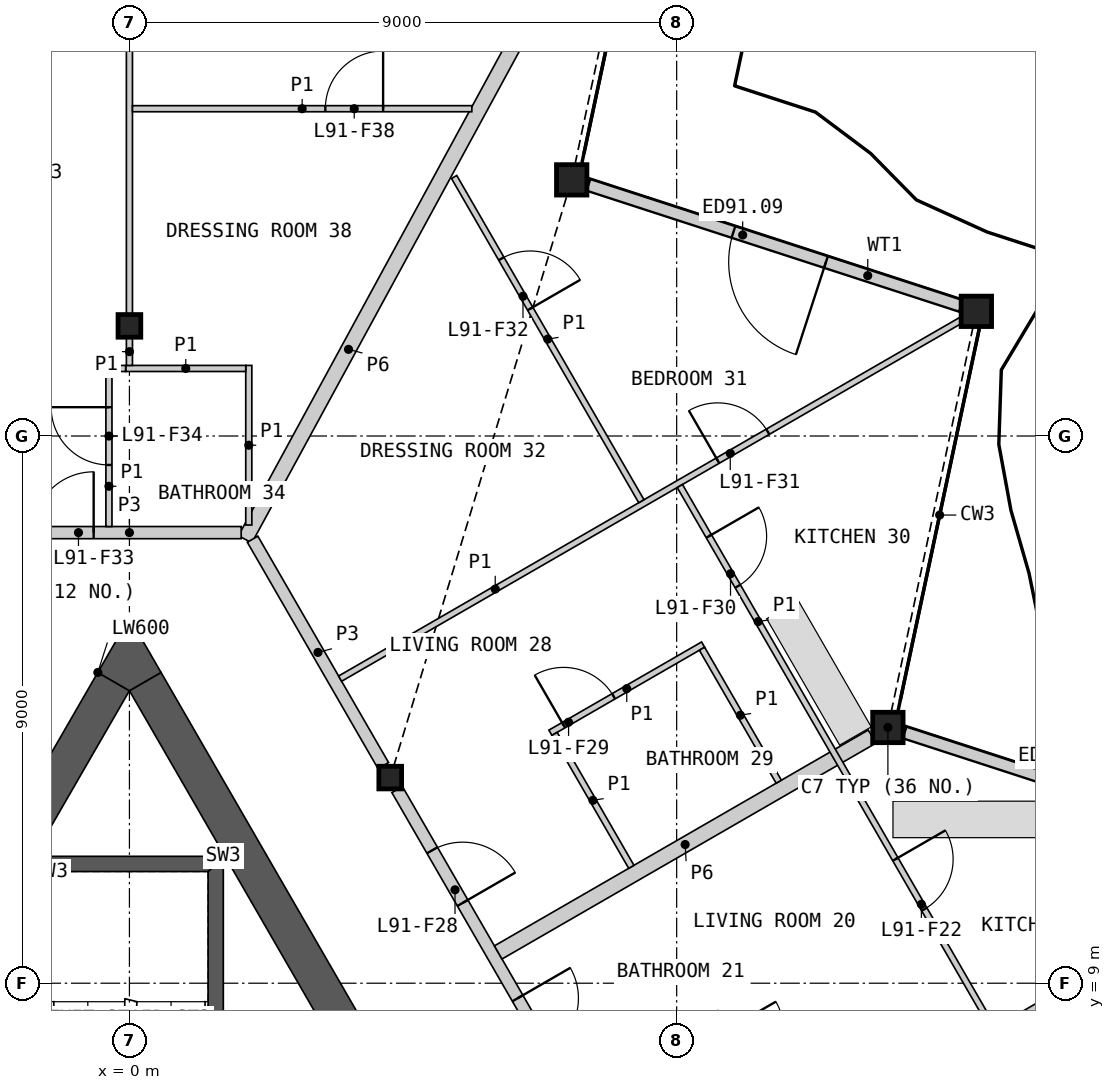
"""IFC4 building model, lengths in metres.
Left out: names, types, materials, properties, quantities, classifications, styles, units other than length and angle.
Written with IfcOpenShell. Run it as: python <this file> out.ifc"""

import sys

from ifc_helpers import new_model, si_unit, direction, frame, frame_2d, origin, origin_2d, place, context, subcontext, project, spatial, polyline, rectangle, hollow_rectangle, i_section, outline, extrude, element, fill, save


model = new_model("IFC4")
c1 = context("Model", 3, precision=1e-05, world=origin(), true_north=direction((0.0, 1.0)))
c2 = subcontext(c1, "Body", "Model", "MODEL_VIEW")
j1 = project(units=[si_unit("LENGTHUNIT", "METRE"), si_unit("PLANEANGLEUNIT", "RADIAN")], contexts=[c1])
p1 = place(None, origin())
s1 = spatial("IfcSite", under=j1, at=p1, CompositionType="ELEMENT")
p2 = place(p1, origin())
s2 = spatial("IfcBuilding", under=s1, at=p2, CompositionType="ELEMENT")
p3 = place(p2, frame((0.0, 0.0, 398.4)))
s3 = spatial("IfcBuildingStorey", under=s2, at=p3, CompositionType="ELEMENT", Elevation=398.4)
for number, where, z_axis, x_axis in (
    (1, (12.474, 13.206, 0.0), (0.0, 0.0, 1.0), (1.0, 0.0, 0.0)),
    (2, (13.929, 20.051, 0.0), (0.0, 0.0, 1.0), (1.0, 0.0, 0.0)),
    (3, (7.274, 22.213, 0.0), (0.0, 0.0, 1.0), (1.0, 0.0, 0.0)),
):
    element("IfcColumn", number, at=place(p3, frame(where, z_axis=z_axis, x_axis=x_axis)), inside=s3, PredefinedType="COLUMN", context=c2, shape_type="SweptSolid", body=[
        extrude(hollow_rectangle(XDim=0.5, YDim=0.5, WallThickness=0.03, at=origin_2d()), origin(), (0.0, 0.0, 1.0), 3.4),
    ])
for number, where, z_axis, x_axis in (
    (4, (0.0, 19.811, 0.0), (0.0, 0.0, 1.0), (1.0, 0.0, 0.0)),
    (5, (4.289, 12.382, 0.0), (0.0, 0.0, 1.0), (1.0, 0.0, 0.0)),
):
    element("IfcColumn", number, at=place(p3, frame(where, z_axis=z_axis, x_axis=x_axis)), inside=s3, PredefinedType="COLUMN", context=c2, shape_type="SweptSolid", body=[
        extrude(i_section(OverallWidth=0.374, OverallDepth=0.372, WebThickness=0.016, FlangeThickness=0.026, at=origin_2d()), origin(), (0.0, 0.0, 1.0), 3.4),
    ])
p4 = place(p3, frame((18.874, 11.134, 0.0), z_axis=(0.0, 0.0, 1.0), x_axis=(-0.951063037463, 0.308996923563, 0.0)))
e6 = element("IfcWall", 6, at=p4, inside=s3, PredefinedType="SOLIDWALL", context=c2, shape_type="SweptSolid", body=[
    extrude(rectangle(XDim=6.44, YDim=0.2, at=frame_2d((3.22, 0.0))), origin(), (0.0, 0.0, 1.0), 2.634),
])
p5 = place(p4, frame((2.333, 0.0, 0.0)))
e7 = element("IfcOpeningElement", 7, at=p5, cuts=e6, PredefinedType="OPENING", context=c2, shape_type="SweptSolid", body=[
    extrude(rectangle(XDim=1.6, YDim=2.25, at=frame_2d((0.8, 1.125))), frame((0.0, 0.11, 0.0), z_axis=(0.0, -1.0, 0.0), x_axis=(1.0, 0.0, 0.0)), (0.0, 0.0, 1.0), 0.22),
])
p6 = place(p3, frame((13.674, 20.14, 0.0), z_axis=(0.0, 0.0, 1.0), x_axis=(-0.951051896423, 0.309031212518, 0.0)))
e8 = element("IfcWall", 8, at=p6, inside=s3, PredefinedType="SOLIDWALL", context=c2, shape_type="SweptSolid", body=[
    extrude(rectangle(XDim=6.44, YDim=0.2, at=frame_2d((3.22, 0.0))), origin(), (0.0, 0.0, 1.0), 2.634),
])
p7 = place(p6, frame((2.333, 0.0, 0.0)))
e9 = element("IfcOpeningElement", 9, at=p7, cuts=e8, PredefinedType="OPENING", context=c2, shape_type="SweptSolid", body=[
    extrude(rectangle(XDim=1.6, YDim=2.25, at=frame_2d((0.8, 1.125))), frame((0.0, 0.11, 0.0), z_axis=(0.0, -1.0, 0.0), x_axis=(1.0, 0.0, 0.0)), (0.0, 0.0, 1.0), 0.22),
])
p8 = place(p3, origin())
e10 = element("IfcWall", 10, at=p8, inside=s3, PredefinedType="SHEAR", context=c2, shape_type="SweptSolid", body=[
    extrude(outline(polyline([(1.544, 5.237), (1.544, 11.087), (1.294, 10.837), (1.294, 5.237), (1.544, 5.237)])), origin(), (0.0, 0.0, 1.0), 3.1),
])
p9 = place(p3, origin())
e11 = element("IfcWall", 11, at=p9, inside=s3, PredefinedType="SHEAR", context=c2, shape_type="SweptSolid", body=[
    extrude(outline(polyline([(1.544, 11.087), (-1.544, 11.087), (-1.294, 10.837), (1.294, 10.837), (1.544, 11.087)])), origin(), (0.0, 0.0, 1.0), 3.1),
])
p10 = place(p3, frame((8.686, -0.634, 0.0), z_axis=(0.0, 0.0, 1.0), x_axis=(-0.500004601921, 0.866022746848, 0.0)))
e12 = element("IfcWall", 12, at=p10, inside=s3, PredefinedType="SHEAR", context=c2, shape_type="SweptSolid", body=[
    extrude(rectangle(XDim=16.853, YDim=0.6, at=frame_2d((8.426, 0.0))), origin(), (0.0, 0.0, 1.0), 3.1),
])
p11 = place(p3, frame((-0.26, 13.961, 0.0), z_axis=(0.0, 0.0, 1.0), x_axis=(-0.50000604952, -0.866021911064, 0.0)))
e13 = element("IfcWall", 13, at=p11, inside=s3, PredefinedType="SHEAR", context=c2, shape_type="SweptSolid", body=[
    extrude(rectangle(XDim=4.869, YDim=0.6, at=frame_2d((2.434, 0.0))), origin(), (0.0, 0.0, 1.0), 3.1),
])
p12 = place(p3, origin())
e14 = element("IfcWall", 14, at=p12, inside=s3, PredefinedType="SHEAR", context=c2, shape_type="SweptSolid", body=[
    extrude(outline(polyline([(-0.52, 14.111), (0.0, 15.011), (0.52, 14.111), (0.0, 13.811), (-0.52, 14.111)])), origin(), (0.0, 0.0, 1.0), 3.1),
])
p13 = place(p3, frame((1.903, 16.301, 0.0), z_axis=(0.0, 0.0, 1.0), x_axis=(0.47791275145, 0.878407309852, 0.0)))
e15 = element("IfcWall", 15, at=p13, inside=s3, PredefinedType="PARTITIONING", context=c2, shape_type="SweptSolid", body=[
    extrude(rectangle(XDim=14.226, YDim=0.25, at=frame_2d((7.113, 0.0))), origin(), (0.0, 0.0, 1.0), 2.33),
])
p14 = place(p3, frame((4.403, 12.185, 0.0), z_axis=(0.0, 0.0, 1.0), x_axis=(0.499992155518, -0.866029932751, 0.0)))
e16 = element("IfcWall", 16, at=p14, inside=s3, PredefinedType="PARTITIONING", context=c2, shape_type="SweptSolid", body=[
    extrude(rectangle(XDim=8.123, YDim=0.2, at=frame_2d((4.062, 0.0))), origin(), (0.0, 0.0, 1.0), 3.1),
])
p15 = place(p14, frame((3.963, 0.0, 0.0)))
e17 = element("IfcOpeningElement", 17, at=p15, cuts=e16, PredefinedType="OPENING", context=c2, shape_type="SweptSolid", body=[
    extrude(rectangle(XDim=1.0, YDim=2.1, at=frame_2d((0.5, 1.05))), frame((0.0, 0.11, 0.0), z_axis=(0.0, -1.0, 0.0), x_axis=(1.0, 0.0, 0.0)), (0.0, 0.0, 1.0), 0.22),
])
p16 = place(p14, frame((1.153, 0.0, 0.0)))
e18 = element("IfcOpeningElement", 18, at=p16, cuts=e16, PredefinedType="OPENING", context=c2, shape_type="SweptSolid", body=[
    extrude(rectangle(XDim=1.0, YDim=2.1, at=frame_2d((0.5, 1.05))), frame((0.0, 0.11, 0.0), z_axis=(0.0, -1.0, 0.0), x_axis=(1.0, 0.0, 0.0)), (0.0, 0.0, 1.0), 0.22),
])
p17 = place(p3, frame((6.065, 9.506, 0.0), z_axis=(0.0, 0.0, 1.0), x_axis=(0.866018949465, 0.500011179042, 0.0)))
e19 = element("IfcWall", 19, at=p17, inside=s3, PredefinedType="PARTITIONING", context=c2, shape_type="SweptSolid", body=[
    extrude(rectangle(XDim=7.1, YDim=0.25, at=frame_2d((3.55, 0.0))), origin(), (0.0, 0.0, 1.0), 2.33),
])
p18 = place(p3, frame((2.025, 16.303, 0.0), z_axis=(0.0, 0.0, 1.0), x_axis=(0.500004215162, -0.866022970146, 0.0)))
e20 = element("IfcWall", 20, at=p18, inside=s3, PredefinedType="PARTITIONING", context=c2, shape_type="SweptSolid", body=[
    extrude(rectangle(XDim=4.3, YDim=0.2, at=frame_2d((2.15, 0.0))), origin(), (0.0, 0.0, 1.0), 3.1),
])
p19 = place(p3, frame((-1.838, 16.411, 0.0), z_axis=(0.0, 0.0, 1.0), x_axis=(1.0, 0.0, 0.0)))
e21 = element("IfcWall", 21, at=p19, inside=s3, PredefinedType="PARTITIONING", context=c2, shape_type="SweptSolid", body=[
    extrude(rectangle(XDim=3.676, YDim=0.2, at=frame_2d((1.838, 0.0))), origin(), (0.0, 0.0, 1.0), 3.1),
])
p20 = place(p19, frame((0.25, 0.0, 0.0)))
e22 = element("IfcOpeningElement", 22, at=p20, cuts=e21, PredefinedType="OPENING", context=c2, shape_type="SweptSolid", body=[
    extrude(rectangle(XDim=1.0, YDim=2.1, at=frame_2d((0.5, 1.05))), frame((0.0, 0.11, 0.0), z_axis=(0.0, -1.0, 0.0), x_axis=(1.0, 0.0, 0.0)), (0.0, 0.0, 1.0), 0.22),
])
p21 = place(p3, frame((3.465, 14.01, 0.0), z_axis=(0.0, 0.0, 1.0), x_axis=(0.866032376801, 0.499987922186, 0.0)))
e23 = element("IfcWall", 23, at=p21, inside=s3, PredefinedType="PARTITIONING", context=c2, shape_type="SweptSolid", body=[
    extrude(rectangle(XDim=11.782, YDim=0.1, at=frame_2d((5.891, 0.0))), origin(), (0.0, 0.0, 1.0), 2.33),
])
p22 = place(p21, frame((7.171, 0.0, 0.0)))
e24 = element("IfcOpeningElement", 24, at=p22, cuts=e23, PredefinedType="OPENING", context=c2, shape_type="SweptSolid", body=[
    extrude(rectangle(XDim=0.95, YDim=2.1, at=frame_2d((0.475, 1.05))), frame((0.0, 0.06, 0.0), z_axis=(0.0, -1.0, 0.0), x_axis=(1.0, 0.0, 0.0)), (0.0, 0.0, 1.0), 0.12),
])
p23 = place(p3, frame((8.775, 5.066, 0.0), z_axis=(0.0, 0.0, 1.0), x_axis=(0.866023724155, 0.500002909193, 0.0)))
e25 = element("IfcWall", 25, at=p23, inside=s3, PredefinedType="PARTITIONING", context=c2, shape_type="SweptSolid", body=[
    extrude(rectangle(XDim=11.655, YDim=0.1, at=frame_2d((5.827, 0.0))), origin(), (0.0, 0.0, 1.0), 2.33),
])
p24 = place(p23, frame((4.252, 0.0, 0.0)))
e26 = element("IfcOpeningElement", 26, at=p24, cuts=e25, PredefinedType="OPENING", context=c2, shape_type="SweptSolid", body=[
    extrude(rectangle(XDim=0.95, YDim=2.1, at=frame_2d((0.475, 1.05))), frame((0.0, 0.06, 0.0), z_axis=(0.0, -1.0, 0.0), x_axis=(1.0, 0.0, 0.0)), (0.0, 0.0, 1.0), 0.12),
])
p25 = place(p3, frame((0.0, 20.008, 0.0), z_axis=(0.0, 0.0, 1.0), x_axis=(0.0, 1.0, 0.0)))
e27 = element("IfcWall", 27, at=p25, inside=s3, PredefinedType="PARTITIONING", context=c2, shape_type="SweptSolid", body=[
    extrude(rectangle(XDim=10.951, YDim=0.1, at=frame_2d((5.476, 0.0))), origin(), (0.0, 0.0, 1.0), 2.33),
])
p26 = place(p25, frame((8.851, 0.0, 0.0)))
e28 = element("IfcOpeningElement", 28, at=p26, cuts=e27, PredefinedType="OPENING", context=c2, shape_type="SweptSolid", body=[
    extrude(rectangle(XDim=0.95, YDim=2.1, at=frame_2d((0.475, 1.05))), frame((0.0, 0.06, 0.0), z_axis=(0.0, -1.0, 0.0), x_axis=(1.0, 0.0, 0.0)), (0.0, 0.0, 1.0), 0.12),
])
p27 = place(p3, frame((9.052, 17.177, 0.0), z_axis=(0.0, 0.0, 1.0), x_axis=(0.499998765615, -0.866026116456, 0.0)))
e29 = element("IfcWall", 29, at=p27, inside=s3, PredefinedType="PARTITIONING", context=c2, shape_type="SweptSolid", body=[
    extrude(rectangle(XDim=10.3, YDim=0.1, at=frame_2d((5.15, 0.0))), origin(), (0.0, 0.0, 1.0), 2.33),
])
p28 = place(p27, frame((7.089, 0.0, 0.0)))
e30 = element("IfcOpeningElement", 30, at=p28, cuts=e29, PredefinedType="OPENING", context=c2, shape_type="SweptSolid", body=[
    extrude(rectangle(XDim=0.95, YDim=2.1, at=frame_2d((0.475, 1.05))), frame((0.0, 0.06, 0.0), z_axis=(0.0, -1.0, 0.0), x_axis=(1.0, 0.0, 0.0)), (0.0, 0.0, 1.0), 0.12),
])
p29 = place(p27, frame((0.954, 0.0, 0.0)))
e31 = element("IfcOpeningElement", 31, at=p29, cuts=e29, PredefinedType="OPENING", context=c2, shape_type="SweptSolid", body=[
    extrude(rectangle(XDim=0.95, YDim=2.1, at=frame_2d((0.475, 1.05))), frame((0.0, 0.06, 0.0), z_axis=(0.0, -1.0, 0.0), x_axis=(1.0, 0.0, 0.0)), (0.0, 0.0, 1.0), 0.12),
])
p30 = place(p3, frame((5.34, 22.26, 0.0), z_axis=(0.0, 0.0, 1.0), x_axis=(0.500027893485, -0.866009298874, 0.0)))
e32 = element("IfcWall", 32, at=p30, inside=s3, PredefinedType="PARTITIONING", context=c2, shape_type="SweptSolid", body=[
    extrude(rectangle(XDim=6.158, YDim=0.1, at=frame_2d((3.079, 0.0))), origin(), (0.0, 0.0, 1.0), 2.33),
])
p31 = place(p30, frame((1.552, 0.0, 0.0)))
e33 = element("IfcOpeningElement", 33, at=p31, cuts=e32, PredefinedType="OPENING", context=c2, shape_type="SweptSolid", body=[
    extrude(rectangle(XDim=0.95, YDim=2.1, at=frame_2d((0.475, 1.05))), frame((0.0, 0.06, 0.0), z_axis=(0.0, -1.0, 0.0), x_axis=(1.0, 0.0, 0.0)), (0.0, 0.0, 1.0), 0.12),
])
p32 = place(p3, frame((0.05, 23.383, 0.0), z_axis=(0.0, 0.0, 1.0), x_axis=(1.0, 0.0, 0.0)))
e34 = element("IfcWall", 34, at=p32, inside=s3, PredefinedType="PARTITIONING", context=c2, shape_type="SweptSolid", body=[
    extrude(rectangle(XDim=5.581, YDim=0.1, at=frame_2d((2.791, 0.0))), origin(), (0.0, 0.0, 1.0), 2.33),
])
p33 = place(p32, frame((3.172, 0.0, 0.0)))
e35 = element("IfcOpeningElement", 35, at=p33, cuts=e34, PredefinedType="OPENING", context=c2, shape_type="SweptSolid", body=[
    extrude(rectangle(XDim=0.95, YDim=2.1, at=frame_2d((0.475, 1.05))), frame((0.0, 0.06, 0.0), z_axis=(0.0, -1.0, 0.0), x_axis=(1.0, 0.0, 0.0)), (0.0, 0.0, 1.0), 0.12),
])
p34 = place(p3, frame((6.923, 13.119, 0.0), z_axis=(0.0, 0.0, 1.0), x_axis=(0.866032775405, 0.499987231761, 0.0)))
e36 = element("IfcWall", 36, at=p34, inside=s3, PredefinedType="PARTITIONING", context=c2, shape_type="SweptSolid", body=[
    extrude(rectangle(XDim=2.9, YDim=0.1, at=frame_2d((1.45, 0.0))), origin(), (0.0, 0.0, 1.0), 2.33),
])
p35 = place(p34, frame((0.25, 0.0, 0.0)))
e37 = element("IfcOpeningElement", 37, at=p35, cuts=e36, PredefinedType="OPENING", context=c2, shape_type="SweptSolid", body=[
    extrude(rectangle(XDim=0.95, YDim=2.1, at=frame_2d((0.475, 1.05))), frame((0.0, 0.06, 0.0), z_axis=(0.0, -1.0, 0.0), x_axis=(1.0, 0.0, 0.0)), (0.0, 0.0, 1.0), 0.12),
])
p36 = place(p3, frame((1.963, 16.536, 0.0), z_axis=(0.0, 0.0, 1.0), x_axis=(0.0, 1.0, 0.0)))
e38 = element("IfcWall", 38, at=p36, inside=s3, PredefinedType="PARTITIONING", context=c2, shape_type="SweptSolid", body=[
    extrude(rectangle(XDim=2.625, YDim=0.1, at=frame_2d((1.312, 0.0))), origin(), (0.0, 0.0, 1.0), 2.33),
])
p37 = place(p3, frame((9.417, 14.501, 0.0), z_axis=(0.0, 0.0, 1.0), x_axis=(0.500048846702, -0.865997200291, 0.0)))
e39 = element("IfcWall", 39, at=p37, inside=s3, PredefinedType="PARTITIONING", context=c2, shape_type="SweptSolid", body=[
    extrude(rectangle(XDim=2.525, YDim=0.1, at=frame_2d((1.263, 0.0))), origin(), (0.0, 0.0, 1.0), 2.33),
])
p38 = place(p3, frame((6.992, 13.101, 0.0), z_axis=(0.0, 0.0, 1.0), x_axis=(0.499976333282, -0.866039067339, 0.0)))
e40 = element("IfcWall", 40, at=p38, inside=s3, PredefinedType="PARTITIONING", context=c2, shape_type="SweptSolid", body=[
    extrude(rectangle(XDim=2.525, YDim=0.1, at=frame_2d((1.262, 0.0))), origin(), (0.0, 0.0, 1.0), 2.33),
])
p39 = place(p3, frame((-0.337, 16.511, 0.0), z_axis=(0.0, 0.0, 1.0), x_axis=(0.0, 1.0, 0.0)))
e41 = element("IfcWall", 41, at=p39, inside=s3, PredefinedType="PARTITIONING", context=c2, shape_type="SweptSolid", body=[
    extrude(rectangle(XDim=2.649, YDim=0.1, at=frame_2d((1.325, 0.0))), origin(), (0.0, 0.0, 1.0), 2.33),
])
p40 = place(p39, frame((1.013, 0.0, 0.0)))
e42 = element("IfcOpeningElement", 42, at=p40, cuts=e41, PredefinedType="OPENING", context=c2, shape_type="SweptSolid", body=[
    extrude(rectangle(XDim=0.95, YDim=2.1, at=frame_2d((0.475, 1.05))), frame((0.0, 0.06, 0.0), z_axis=(0.0, -1.0, 0.0), x_axis=(1.0, 0.0, 0.0)), (0.0, 0.0, 1.0), 0.12),
])
p41 = place(p3, frame((-0.06, 19.111, 0.0), z_axis=(0.0, 0.0, 1.0), x_axis=(1.0, 0.0, 0.0)))
e43 = element("IfcWall", 43, at=p41, inside=s3, PredefinedType="PARTITIONING", context=c2, shape_type="SweptSolid", body=[
    extrude(rectangle(XDim=1.973, YDim=0.1, at=frame_2d((0.987, 0.0))), origin(), (0.0, 0.0, 1.0), 2.33),
])
p42 = place(p3, frame((0.0, 19.161, 0.0), z_axis=(0.0, 0.0, 1.0), x_axis=(0.0, 1.0, 0.0)))
e44 = element("IfcWall", 44, at=p42, inside=s3, PredefinedType="PARTITIONING", context=c2, shape_type="SweptSolid", body=[
    extrude(rectangle(XDim=0.453, YDim=0.1, at=frame_2d((0.227, 0.0))), origin(), (0.0, 0.0, 1.0), 2.33),
])
p43 = place(p3, frame((-0.287, 19.11, 0.0), z_axis=(0.0, 0.0, 1.0), x_axis=(0.999997637059, 0.002173907907, 0.0)))
e45 = element("IfcWall", 45, at=p43, inside=s3, PredefinedType="PARTITIONING", context=c2, shape_type="SweptSolid", body=[
    extrude(rectangle(XDim=0.225, YDim=0.1, at=frame_2d((0.112, 0.0))), origin(), (0.0, 0.0, 1.0), 2.33),
])
p44 = place(p7, origin())
e46 = element("IfcDoor", 46, at=p44, inside=s3, OperationType="DOUBLE_DOOR_SINGLE_SWING", PredefinedType="DOOR", context=c2, shape_type="SweptSolid", body=[
    extrude(rectangle(XDim=1.6, YDim=2.25, at=frame_2d((0.8, 1.125))), frame((0.0, 0.025, 0.0), z_axis=(0.0, -1.0, 0.0), x_axis=(1.0, 0.0, 0.0)), (0.0, 0.0, 1.0), 0.05),
])
fill(e9, e46)
p45 = place(p15, origin())
e47 = element("IfcDoor", 47, at=p45, inside=s3, OperationType="SINGLE_SWING_LEFT", PredefinedType="DOOR", context=c2, shape_type="SweptSolid", body=[
    extrude(rectangle(XDim=1.0, YDim=2.1, at=frame_2d((0.5, 1.05))), frame((0.0, 0.025, 0.0), z_axis=(0.0, -1.0, 0.0), x_axis=(1.0, 0.0, 0.0)), (0.0, 0.0, 1.0), 0.05),
])
fill(e17, e47)
p46 = place(p28, origin())
e48 = element("IfcDoor", 48, at=p46, inside=s3, OperationType="SINGLE_SWING_LEFT", PredefinedType="DOOR", context=c2, shape_type="SweptSolid", body=[
    extrude(rectangle(XDim=0.95, YDim=2.1, at=frame_2d((0.475, 1.05))), frame((0.0, 0.025, 0.0), z_axis=(0.0, -1.0, 0.0), x_axis=(1.0, 0.0, 0.0)), (0.0, 0.0, 1.0), 0.05),
])
fill(e30, e48)
p47 = place(p16, origin())
e49 = element("IfcDoor", 49, at=p47, inside=s3, OperationType="SINGLE_SWING_RIGHT", PredefinedType="DOOR", context=c2, shape_type="SweptSolid", body=[
    extrude(rectangle(XDim=1.0, YDim=2.1, at=frame_2d((0.5, 1.05))), frame((0.0, 0.025, 0.0), z_axis=(0.0, -1.0, 0.0), x_axis=(1.0, 0.0, 0.0)), (0.0, 0.0, 1.0), 0.05),
])
fill(e18, e49)
p48 = place(p35, origin())
e50 = element("IfcDoor", 50, at=p48, inside=s3, OperationType="SINGLE_SWING_LEFT", PredefinedType="DOOR", context=c2, shape_type="SweptSolid", body=[
    extrude(rectangle(XDim=0.95, YDim=2.1, at=frame_2d((0.475, 1.05))), frame((0.0, 0.025, 0.0), z_axis=(0.0, -1.0, 0.0), x_axis=(1.0, 0.0, 0.0)), (0.0, 0.0, 1.0), 0.05),
])
fill(e37, e50)
p49 = place(p29, origin())
e51 = element("IfcDoor", 51, at=p49, inside=s3, OperationType="SINGLE_SWING_LEFT", PredefinedType="DOOR", context=c2, shape_type="SweptSolid", body=[
    extrude(rectangle(XDim=0.95, YDim=2.1, at=frame_2d((0.475, 1.05))), frame((0.0, 0.025, 0.0), z_axis=(0.0, -1.0, 0.0), x_axis=(1.0, 0.0, 0.0)), (0.0, 0.0, 1.0), 0.05),
])
fill(e31, e51)
p50 = place(p22, origin())
e52 = element("IfcDoor", 52, at=p50, inside=s3, OperationType="SINGLE_SWING_LEFT", PredefinedType="DOOR", context=c2, shape_type="SweptSolid", body=[
    extrude(rectangle(XDim=0.95, YDim=2.1, at=frame_2d((0.475, 1.05))), frame((0.0, 0.025, 0.0), z_axis=(0.0, -1.0, 0.0), x_axis=(1.0, 0.0, 0.0)), (0.0, 0.0, 1.0), 0.05),
])
fill(e24, e52)
p51 = place(p31, origin())
e53 = element("IfcDoor", 53, at=p51, inside=s3, OperationType="SINGLE_SWING_RIGHT", PredefinedType="DOOR", context=c2, shape_type="SweptSolid", body=[
    extrude(rectangle(XDim=0.95, YDim=2.1, at=frame_2d((0.475, 1.05))), frame((0.0, 0.025, 0.0), z_axis=(0.0, -1.0, 0.0), x_axis=(1.0, 0.0, 0.0)), (0.0, 0.0, 1.0), 0.05),
])
fill(e33, e53)
p52 = place(p20, origin())
e54 = element("IfcDoor", 54, at=p52, inside=s3, OperationType="SINGLE_SWING_RIGHT", PredefinedType="DOOR", context=c2, shape_type="SweptSolid", body=[
    extrude(rectangle(XDim=1.0, YDim=2.1, at=frame_2d((0.5, 1.05))), frame((0.0, 0.025, 0.0), z_axis=(0.0, -1.0, 0.0), x_axis=(1.0, 0.0, 0.0)), (0.0, 0.0, 1.0), 0.05),
])
fill(e22, e54)
p53 = place(p40, origin())
e55 = element("IfcDoor", 55, at=p53, inside=s3, OperationType="SINGLE_SWING_RIGHT", PredefinedType="DOOR", context=c2, shape_type="SweptSolid", body=[
    extrude(rectangle(XDim=0.95, YDim=2.1, at=frame_2d((0.475, 1.05))), frame((0.0, 0.025, 0.0), z_axis=(0.0, -1.0, 0.0), x_axis=(1.0, 0.0, 0.0)), (0.0, 0.0, 1.0), 0.05),
])
fill(e42, e55)
p54 = place(p33, origin())
e56 = element("IfcDoor", 56, at=p54, inside=s3, OperationType="SINGLE_SWING_RIGHT", PredefinedType="DOOR", context=c2, shape_type="SweptSolid", body=[
    extrude(rectangle(XDim=0.95, YDim=2.1, at=frame_2d((0.475, 1.05))), frame((0.0, 0.025, 0.0), z_axis=(0.0, -1.0, 0.0), x_axis=(1.0, 0.0, 0.0)), (0.0, 0.0, 1.0), 0.05),
])
fill(e35, e56)
save(model, sys.argv[1])
